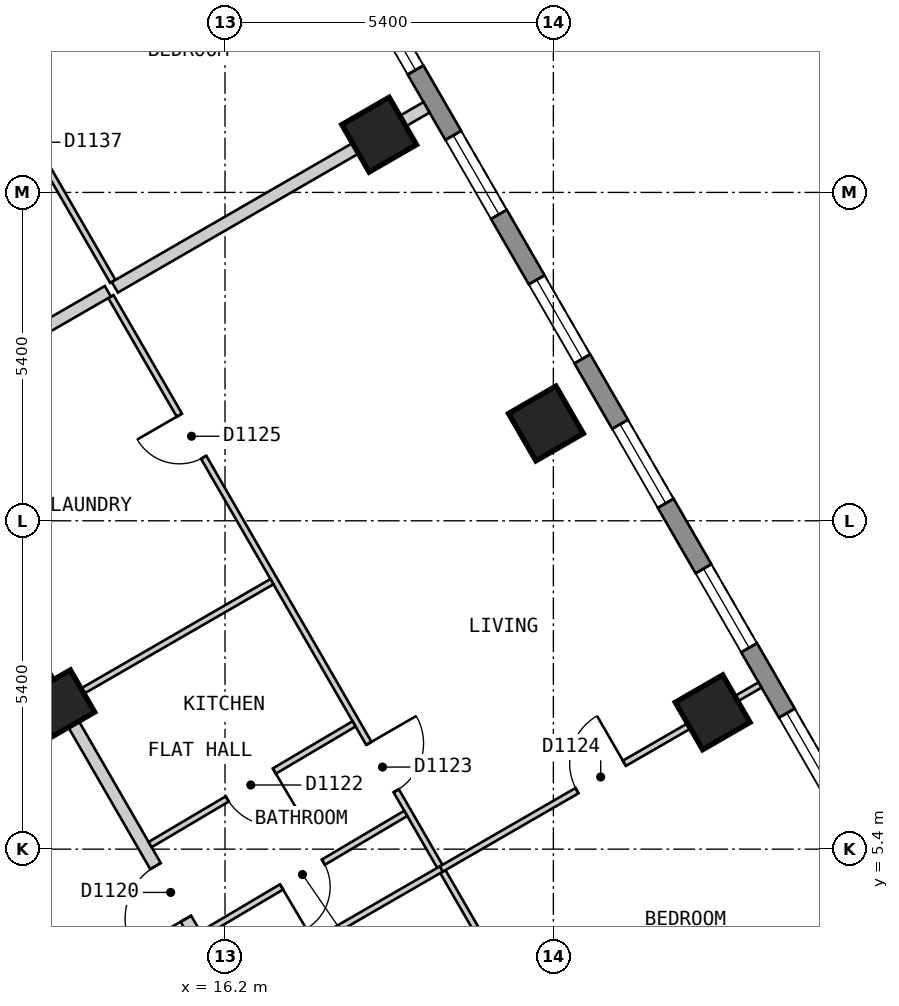
"""IFC4 building model, lengths in metres.
Left out: names, types, materials, properties, quantities, classifications, styles, units other than length and angle.
Written with IfcOpenShell. Run it as: python <this file> out.ifc"""

import sys

from ifc_helpers import new_model, si_unit, direction, frame, frame_2d, origin, origin_2d, place, context, subcontext, project, spatial, polyline, rectangle, outline, extrude, element, fill, save


model = new_model("IFC4")
c1 = context("Model", 3, precision=1e-05, world=origin(), true_north=direction((0.0, 1.0)))
c2 = subcontext(c1, "Body", "Model", "MODEL_VIEW")
j1 = project(units=[si_unit("LENGTHUNIT", "METRE"), si_unit("PLANEANGLEUNIT", "RADIAN")], contexts=[c1])
p1 = place(None, origin())
s1 = spatial("IfcSite", under=j1, at=p1, CompositionType="ELEMENT")
p2 = place(p1, origin())
s2 = spatial("IfcBuilding", under=s1, at=p2, CompositionType="ELEMENT")
p3 = place(p2, frame((0.0, 0.0, 150.6)))
s3 = spatial("IfcBuildingStorey", under=s2, at=p3, CompositionType="ELEMENT", Elevation=150.6)
for number, where, z_axis, x_axis in (
    (1, (24.22, 7.65, 0.0), (0.0, 0.0, 1.0), (-0.5, 0.866, 0.0)),
    (2, (21.478, 12.4, 0.0), (0.0, 0.0, 1.0), (-0.5, 0.866, 0.0)),
    (3, (18.735, 17.15, 0.0), (0.0, 0.0, 1.0), (-0.5, 0.866, 0.0)),
):
    element("IfcColumn", number, at=place(p3, frame(where, z_axis=z_axis, x_axis=x_axis)), inside=s3, PredefinedType="COLUMN", context=c2, shape_type="SweptSolid", body=[
        extrude(rectangle(XDim=0.9, YDim=0.9, at=origin_2d()), origin(), (0.0, 0.0, 1.0), 3.0),
    ])
p4 = place(p3, frame((13.51, 7.8, 0.0), z_axis=(0.0, 0.0, 1.0), x_axis=(-0.5, 0.866025403784, 0.0)))
e4 = element("IfcColumn", 4, at=p4, inside=s3, PredefinedType="COLUMN", context=c2, shape_type="SweptSolid", body=[
    extrude(rectangle(XDim=0.8, YDim=0.8, at=origin_2d()), origin(), (0.0, 0.0, 1.0), 3.0),
])
p5 = place(p3, frame((28.218, 2.825, 0.0), z_axis=(0.0, 0.0, 1.0), x_axis=(-0.500020536353, 0.866013546791, 0.0)))
e5 = element("IfcWall", 5, at=p5, inside=s3, PredefinedType="SOLIDWALL", context=c2, shape_type="SweptSolid", body=[
    extrude(outline(polyline([(0.0, -0.15), (23.325, -0.15), (23.245, 0.15), (0.08, 0.15), (0.0, -0.15)])), origin(), (0.0, 0.0, 1.0), 2.6),
])
p6 = place(p5, frame((1.314, 0.0, 0.15)))
e6 = element("IfcOpeningElement", 6, at=p6, cuts=e5, PredefinedType="OPENING", context=c2, shape_type="SweptSolid", body=[
    extrude(rectangle(XDim=1.5, YDim=2.1, at=frame_2d((0.75, 1.05))), frame((0.0, 0.16, 0.0), z_axis=(0.0, -1.0, 0.0), x_axis=(1.0, 0.0, 0.0)), (0.0, 0.0, 1.0), 0.32),
])
p7 = place(p5, frame((4.056, 0.0, 0.15)))
e7 = element("IfcOpeningElement", 7, at=p7, cuts=e5, PredefinedType="OPENING", context=c2, shape_type="SweptSolid", body=[
    extrude(rectangle(XDim=1.5, YDim=2.1, at=frame_2d((0.75, 1.05))), frame((0.0, 0.16, 0.0), z_axis=(0.0, -1.0, 0.0), x_axis=(1.0, 0.0, 0.0)), (0.0, 0.0, 1.0), 0.32),
])
p8 = place(p5, frame((6.798, 0.0, 0.15)))
e8 = element("IfcOpeningElement", 8, at=p8, cuts=e5, PredefinedType="OPENING", context=c2, shape_type="SweptSolid", body=[
    extrude(rectangle(XDim=1.5, YDim=2.1, at=frame_2d((0.75, 1.05))), frame((0.0, 0.16, 0.0), z_axis=(0.0, -1.0, 0.0), x_axis=(1.0, 0.0, 0.0)), (0.0, 0.0, 1.0), 0.32),
])
p9 = place(p5, frame((9.541, 0.0, 0.15)))
e9 = element("IfcOpeningElement", 9, at=p9, cuts=e5, PredefinedType="OPENING", context=c2, shape_type="SweptSolid", body=[
    extrude(rectangle(XDim=1.5, YDim=2.1, at=frame_2d((0.75, 1.05))), frame((0.0, 0.16, 0.0), z_axis=(0.0, -1.0, 0.0), x_axis=(1.0, 0.0, 0.0)), (0.0, 0.0, 1.0), 0.32),
])
p10 = place(p5, frame((12.284, 0.0, 0.15)))
e10 = element("IfcOpeningElement", 10, at=p10, cuts=e5, PredefinedType="OPENING", context=c2, shape_type="SweptSolid", body=[
    extrude(rectangle(XDim=1.5, YDim=2.1, at=frame_2d((0.75, 1.05))), frame((0.0, 0.16, 0.0), z_axis=(0.0, -1.0, 0.0), x_axis=(1.0, 0.0, 0.0)), (0.0, 0.0, 1.0), 0.32),
])
p11 = place(p5, frame((15.027, 0.0, 0.15)))
e11 = element("IfcOpeningElement", 11, at=p11, cuts=e5, PredefinedType="OPENING", context=c2, shape_type="SweptSolid", body=[
    extrude(rectangle(XDim=1.5, YDim=2.1, at=frame_2d((0.75, 1.05))), frame((0.0, 0.16, 0.0), z_axis=(0.0, -1.0, 0.0), x_axis=(1.0, 0.0, 0.0)), (0.0, 0.0, 1.0), 0.32),
])
p12 = place(p5, frame((17.769, 0.0, 0.15)))
e12 = element("IfcOpeningElement", 12, at=p12, cuts=e5, PredefinedType="OPENING", context=c2, shape_type="SweptSolid", body=[
    extrude(rectangle(XDim=1.5, YDim=2.1, at=frame_2d((0.75, 1.05))), frame((0.0, 0.16, 0.0), z_axis=(0.0, -1.0, 0.0), x_axis=(1.0, 0.0, 0.0)), (0.0, 0.0, 1.0), 0.32),
])
p13 = place(p5, frame((20.511, 0.0, 0.15)))
e13 = element("IfcOpeningElement", 13, at=p13, cuts=e5, PredefinedType="OPENING", context=c2, shape_type="SweptSolid", body=[
    extrude(rectangle(XDim=1.5, YDim=2.1, at=frame_2d((0.75, 1.05))), frame((0.0, 0.16, 0.0), z_axis=(0.0, -1.0, 0.0), x_axis=(1.0, 0.0, 0.0)), (0.0, 0.0, 1.0), 0.32),
])
p14 = place(p3, frame((7.967, 13.0, 0.0), z_axis=(0.0, 0.0, 1.0), x_axis=(0.50003774998, -0.866003607726, 0.0)))
e14 = element("IfcWall", 14, at=p14, inside=s3, PredefinedType="PARTITIONING", context=c2, shape_type="SweptSolid", body=[
    extrude(rectangle(XDim=14.433, YDim=0.2, at=frame_2d((7.217, 0.0))), origin(), (0.0, 0.0, 1.0), 2.6),
])
p15 = place(p14, frame((6.824, 0.0, 0.0)))
e15 = element("IfcOpeningElement", 15, at=p15, cuts=e14, PredefinedType="OPENING", context=c2, shape_type="SweptSolid", body=[
    extrude(rectangle(XDim=0.9, YDim=2.1, at=frame_2d((0.45, 1.05))), frame((0.0, 0.11, 0.0), z_axis=(0.0, -1.0, 0.0), x_axis=(1.0, 0.0, 0.0)), (0.0, 0.0, 1.0), 0.22),
])
p16 = place(p3, frame((9.296, 15.1, 0.0), z_axis=(0.0, 0.0, 1.0), x_axis=(0.499974024244, -0.866040400375, 0.0)))
e16 = element("IfcWall", 16, at=p16, inside=s3, PredefinedType="PARTITIONING", context=c2, shape_type="SweptSolid", body=[
    extrude(rectangle(XDim=16.857, YDim=0.2, at=frame_2d((8.429, 0.0))), origin(), (0.0, 0.0, 1.0), 2.6),
])
p17 = place(p16, frame((11.522, 0.0, 0.0)))
e17 = element("IfcOpeningElement", 17, at=p17, cuts=e16, PredefinedType="OPENING", context=c2, shape_type="SweptSolid", body=[
    extrude(rectangle(XDim=1.0, YDim=2.1, at=frame_2d((0.5, 1.05))), frame((0.0, 0.11, 0.0), z_axis=(0.0, -1.0, 0.0), x_axis=(1.0, 0.0, 0.0)), (0.0, 0.0, 1.0), 0.22),
])
p18 = place(p3, frame((14.323, 14.487, 0.0), z_axis=(0.0, 0.0, 1.0), x_axis=(0.500011052545, -0.866019022501, 0.0)))
e18 = element("IfcWall", 18, at=p18, inside=s3, PredefinedType="PARTITIONING", context=c2, shape_type="SweptSolid", body=[
    extrude(rectangle(XDim=16.208, YDim=0.1, at=frame_2d((8.104, 0.0))), origin(), (0.0, 0.0, 1.0), 2.6),
])
p19 = place(p18, frame((8.484, 0.0, 0.0)))
e19 = element("IfcOpeningElement", 19, at=p19, cuts=e18, PredefinedType="OPENING", context=c2, shape_type="SweptSolid", body=[
    extrude(rectangle(XDim=0.9, YDim=2.1, at=frame_2d((0.45, 1.05))), frame((0.0, 0.06, 0.0), z_axis=(0.0, -1.0, 0.0), x_axis=(1.0, 0.0, 0.0)), (0.0, 0.0, 1.0), 0.12),
])
p20 = place(p18, frame((2.252, 0.0, 0.0)))
e20 = element("IfcOpeningElement", 20, at=p20, cuts=e18, PredefinedType="OPENING", context=c2, shape_type="SweptSolid", body=[
    extrude(rectangle(XDim=0.8, YDim=2.1, at=frame_2d((0.4, 1.05))), frame((0.0, 0.06, 0.0), z_axis=(0.0, -1.0, 0.0), x_axis=(1.0, 0.0, 0.0)), (0.0, 0.0, 1.0), 0.12),
])
p21 = place(p18, frame((13.167, 0.0, 0.0)))
e21 = element("IfcOpeningElement", 21, at=p21, cuts=e18, PredefinedType="OPENING", context=c2, shape_type="SweptSolid", body=[
    extrude(rectangle(XDim=0.8, YDim=2.1, at=frame_2d((0.4, 1.05))), frame((0.0, 0.06, 0.0), z_axis=(0.0, -1.0, 0.0), x_axis=(1.0, 0.0, 0.0)), (0.0, 0.0, 1.0), 0.12),
])
p22 = place(p3, frame((11.713, 19.313, 0.0), z_axis=(0.0, 0.0, 1.0), x_axis=(0.499945064984, -0.866057118208, 0.0)))
e22 = element("IfcWall", 22, at=p22, inside=s3, PredefinedType="PARTITIONING", context=c2, shape_type="SweptSolid", body=[
    extrude(rectangle(XDim=5.285, YDim=0.1, at=frame_2d((2.642, 0.0))), origin(), (0.0, 0.0, 1.0), 2.6),
])
p23 = place(p22, frame((2.242, 0.0, 0.0)))
e23 = element("IfcOpeningElement", 23, at=p23, cuts=e22, PredefinedType="OPENING", context=c2, shape_type="SweptSolid", body=[
    extrude(rectangle(XDim=0.8, YDim=2.1, at=frame_2d((0.4, 1.05))), frame((0.0, 0.06, 0.0), z_axis=(0.0, -1.0, 0.0), x_axis=(1.0, 0.0, 0.0)), (0.0, 0.0, 1.0), 0.12),
])
p24 = place(p3, frame((16.339, 3.1, 0.0), z_axis=(0.0, 0.0, 1.0), x_axis=(0.866031112038, 0.499990112884, 0.0)))
e24 = element("IfcWall", 24, at=p24, inside=s3, PredefinedType="PARTITIONING", context=c2, shape_type="SweptSolid", body=[
    extrude(rectangle(XDim=3.948, YDim=0.1, at=frame_2d((1.974, 0.0))), origin(), (0.0, 0.0, 1.0), 2.6),
])
p25 = place(p3, frame((13.597, 7.85, 0.0), z_axis=(0.0, 0.0, 1.0), x_axis=(0.865979019114, 0.500080332001, 0.0)))
e25 = element("IfcWall", 25, at=p25, inside=s3, PredefinedType="PARTITIONING", context=c2, shape_type="SweptSolid", body=[
    extrude(rectangle(XDim=3.897, YDim=0.1, at=frame_2d((1.949, 0.0))), origin(), (0.0, 0.0, 1.0), 2.6),
])
p26 = place(p3, frame((15.818, 4.002, 0.0), z_axis=(0.0, 0.0, 1.0), x_axis=(0.860457323494, 0.509522516132, 0.0)))
e26 = element("IfcWall", 26, at=p26, inside=s3, PredefinedType="PARTITIONING", context=c2, shape_type="SweptSolid", body=[
    extrude(rectangle(XDim=3.898, YDim=0.1, at=frame_2d((1.949, 0.0))), origin(), (0.0, 0.0, 1.0), 2.6),
])
p27 = place(p26, frame((1.524, 0.0, 0.0)))
e27 = element("IfcOpeningElement", 27, at=p27, cuts=e26, PredefinedType="OPENING", context=c2, shape_type="SweptSolid", body=[
    extrude(rectangle(XDim=0.8, YDim=2.1, at=frame_2d((0.4, 1.05))), frame((0.0, 0.06, 0.0), z_axis=(0.0, -1.0, 0.0), x_axis=(1.0, 0.0, 0.0)), (0.0, 0.0, 1.0), 0.12),
])
p28 = place(p3, frame((14.968, 5.475, 0.0), z_axis=(0.0, 0.0, 1.0), x_axis=(0.860594613521, 0.509290596005, 0.0)))
e28 = element("IfcWall", 28, at=p28, inside=s3, PredefinedType="PARTITIONING", context=c2, shape_type="SweptSolid", body=[
    extrude(rectangle(XDim=3.897, YDim=0.1, at=frame_2d((1.949, 0.0))), origin(), (0.0, 0.0, 1.0), 2.6),
])
p29 = place(p28, frame((1.474, 0.0, 0.0)))
e29 = element("IfcOpeningElement", 29, at=p29, cuts=e28, PredefinedType="OPENING", context=c2, shape_type="SweptSolid", body=[
    extrude(rectangle(XDim=0.9, YDim=2.1, at=frame_2d((0.45, 1.05))), frame((0.0, 0.06, 0.0), z_axis=(0.0, -1.0, 0.0), x_axis=(1.0, 0.0, 0.0)), (0.0, 0.0, 1.0), 0.12),
])
p30 = place(p3, frame((10.854, 12.6, 0.0), z_axis=(0.0, 0.0, 1.0), x_axis=(0.866031112038, 0.499990112884, 0.0)))
e30 = element("IfcWall", 30, at=p30, inside=s3, PredefinedType="PARTITIONING", context=c2, shape_type="SweptSolid", body=[
    extrude(rectangle(XDim=3.948, YDim=0.2, at=frame_2d((1.974, 0.0))), origin(), (0.0, 0.0, 1.0), 2.6),
])
p31 = place(p3, frame((14.388, 14.64, 0.0), z_axis=(0.0, 0.0, 1.0), x_axis=(0.866044090212, 0.499967632761, 0.0)))
e31 = element("IfcWall", 31, at=p31, inside=s3, PredefinedType="PARTITIONING", context=c2, shape_type="SweptSolid", body=[
    extrude(rectangle(XDim=5.919, YDim=0.2, at=frame_2d((2.959, 0.0))), origin(), (0.0, 0.0, 1.0), 2.6),
])
p32 = place(p3, frame((19.758, 5.074, 0.0), z_axis=(0.0, 0.0, 1.0), x_axis=(0.866007554612, 0.500030914399, 0.0)))
e32 = element("IfcWall", 32, at=p32, inside=s3, PredefinedType="PARTITIONING", context=c2, shape_type="SweptSolid", body=[
    extrude(rectangle(XDim=6.052, YDim=0.1, at=frame_2d((3.026, 0.0))), origin(), (0.0, 0.0, 1.0), 2.6),
])
p33 = place(p32, frame((2.576, 0.0, 0.0)))
e33 = element("IfcOpeningElement", 33, at=p33, cuts=e32, PredefinedType="OPENING", context=c2, shape_type="SweptSolid", body=[
    extrude(rectangle(XDim=0.9, YDim=2.1, at=frame_2d((0.45, 1.05))), frame((0.0, 0.06, 0.0), z_axis=(0.0, -1.0, 0.0), x_axis=(1.0, 0.0, 0.0)), (0.0, 0.0, 1.0), 0.12),
])
p34 = place(p7, origin())
e34 = element("IfcWindow", 34, at=p34, inside=s3, PartitioningType="SINGLE_PANEL", PredefinedType="WINDOW", context=c2, shape_type="SweptSolid", body=[
    extrude(rectangle(XDim=1.5, YDim=2.1, at=frame_2d((0.75, 1.05))), frame((0.0, 0.03, 0.0), z_axis=(0.0, -1.0, 0.0), x_axis=(1.0, 0.0, 0.0)), (0.0, 0.0, 1.0), 0.06),
])
fill(e7, e34)
p35 = place(p8, origin())
e35 = element("IfcWindow", 35, at=p35, inside=s3, PartitioningType="SINGLE_PANEL", PredefinedType="WINDOW", context=c2, shape_type="SweptSolid", body=[
    extrude(rectangle(XDim=1.5, YDim=2.1, at=frame_2d((0.75, 1.05))), frame((0.0, 0.03, 0.0), z_axis=(0.0, -1.0, 0.0), x_axis=(1.0, 0.0, 0.0)), (0.0, 0.0, 1.0), 0.06),
])
fill(e8, e35)
p36 = place(p9, origin())
e36 = element("IfcWindow", 36, at=p36, inside=s3, PartitioningType="SINGLE_PANEL", PredefinedType="WINDOW", context=c2, shape_type="SweptSolid", body=[
    extrude(rectangle(XDim=1.5, YDim=2.1, at=frame_2d((0.75, 1.05))), frame((0.0, 0.03, 0.0), z_axis=(0.0, -1.0, 0.0), x_axis=(1.0, 0.0, 0.0)), (0.0, 0.0, 1.0), 0.06),
])
fill(e9, e36)
p37 = place(p10, origin())
e37 = element("IfcWindow", 37, at=p37, inside=s3, PartitioningType="SINGLE_PANEL", PredefinedType="WINDOW", context=c2, shape_type="SweptSolid", body=[
    extrude(rectangle(XDim=1.5, YDim=2.1, at=frame_2d((0.75, 1.05))), frame((0.0, 0.03, 0.0), z_axis=(0.0, -1.0, 0.0), x_axis=(1.0, 0.0, 0.0)), (0.0, 0.0, 1.0), 0.06),
])
fill(e10, e37)
p38 = place(p11, origin())
e38 = element("IfcWindow", 38, at=p38, inside=s3, PartitioningType="SINGLE_PANEL", PredefinedType="WINDOW", context=c2, shape_type="SweptSolid", body=[
    extrude(rectangle(XDim=1.5, YDim=2.1, at=frame_2d((0.75, 1.05))), frame((0.0, 0.03, 0.0), z_axis=(0.0, -1.0, 0.0), x_axis=(1.0, 0.0, 0.0)), (0.0, 0.0, 1.0), 0.06),
])
fill(e11, e38)
p39 = place(p12, origin())
e39 = element("IfcWindow", 39, at=p39, inside=s3, PartitioningType="SINGLE_PANEL", PredefinedType="WINDOW", context=c2, shape_type="SweptSolid", body=[
    extrude(rectangle(XDim=1.5, YDim=2.1, at=frame_2d((0.75, 1.05))), frame((0.0, 0.03, 0.0), z_axis=(0.0, -1.0, 0.0), x_axis=(1.0, 0.0, 0.0)), (0.0, 0.0, 1.0), 0.06),
])
fill(e12, e39)
p40 = place(p17, origin())
e40 = element("IfcDoor", 40, at=p40, inside=s3, OperationType="SINGLE_SWING_RIGHT", PredefinedType="DOOR", context=c2, shape_type="SweptSolid", body=[
    extrude(rectangle(XDim=1.0, YDim=2.1, at=frame_2d((0.5, 1.05))), frame((0.0, 0.025, 0.0), z_axis=(0.0, -1.0, 0.0), x_axis=(1.0, 0.0, 0.0)), (0.0, 0.0, 1.0), 0.05),
])
fill(e17, e40)
p41 = place(p27, origin())
e41 = element("IfcDoor", 41, at=p41, inside=s3, OperationType="SINGLE_SWING_LEFT", PredefinedType="DOOR", context=c2, shape_type="SweptSolid", body=[
    extrude(rectangle(XDim=0.8, YDim=2.1, at=frame_2d((0.4, 1.05))), frame((0.0, 0.025, 0.0), z_axis=(0.0, -1.0, 0.0), x_axis=(1.0, 0.0, 0.0)), (0.0, 0.0, 1.0), 0.05),
])
fill(e27, e41)
p42 = place(p29, origin())
e42 = element("IfcDoor", 42, at=p42, inside=s3, OperationType="SINGLE_SWING_RIGHT", PredefinedType="DOOR", context=c2, shape_type="SweptSolid", body=[
    extrude(rectangle(XDim=0.9, YDim=2.1, at=frame_2d((0.45, 1.05))), frame((0.0, 0.025, 0.0), z_axis=(0.0, -1.0, 0.0), x_axis=(1.0, 0.0, 0.0)), (0.0, 0.0, 1.0), 0.05),
])
fill(e29, e42)
p43 = place(p19, origin())
e43 = element("IfcDoor", 43, at=p43, inside=s3, OperationType="SINGLE_SWING_LEFT", PredefinedType="DOOR", context=c2, shape_type="SweptSolid", body=[
    extrude(rectangle(XDim=0.9, YDim=2.1, at=frame_2d((0.45, 1.05))), frame((0.0, 0.025, 0.0), z_axis=(0.0, -1.0, 0.0), x_axis=(1.0, 0.0, 0.0)), (0.0, 0.0, 1.0), 0.05),
])
fill(e19, e43)
p44 = place(p33, origin())
e44 = element("IfcDoor", 44, at=p44, inside=s3, OperationType="SINGLE_SWING_RIGHT", PredefinedType="DOOR", context=c2, shape_type="SweptSolid", body=[
    extrude(rectangle(XDim=0.9, YDim=2.1, at=frame_2d((0.45, 1.05))), frame((0.0, 0.025, 0.0), z_axis=(0.0, -1.0, 0.0), x_axis=(1.0, 0.0, 0.0)), (0.0, 0.0, 1.0), 0.05),
])
fill(e33, e44)
p45 = place(p20, origin())
e45 = element("IfcDoor", 45, at=p45, inside=s3, OperationType="SINGLE_SWING_LEFT", PredefinedType="DOOR", context=c2, shape_type="SweptSolid", body=[
    extrude(rectangle(XDim=0.8, YDim=2.1, at=frame_2d((0.4, 1.05))), frame((0.0, 0.025, 0.0), z_axis=(0.0, -1.0, 0.0), x_axis=(1.0, 0.0, 0.0)), (0.0, 0.0, 1.0), 0.05),
])
fill(e20, e45)
save(model, sys.argv[1])
